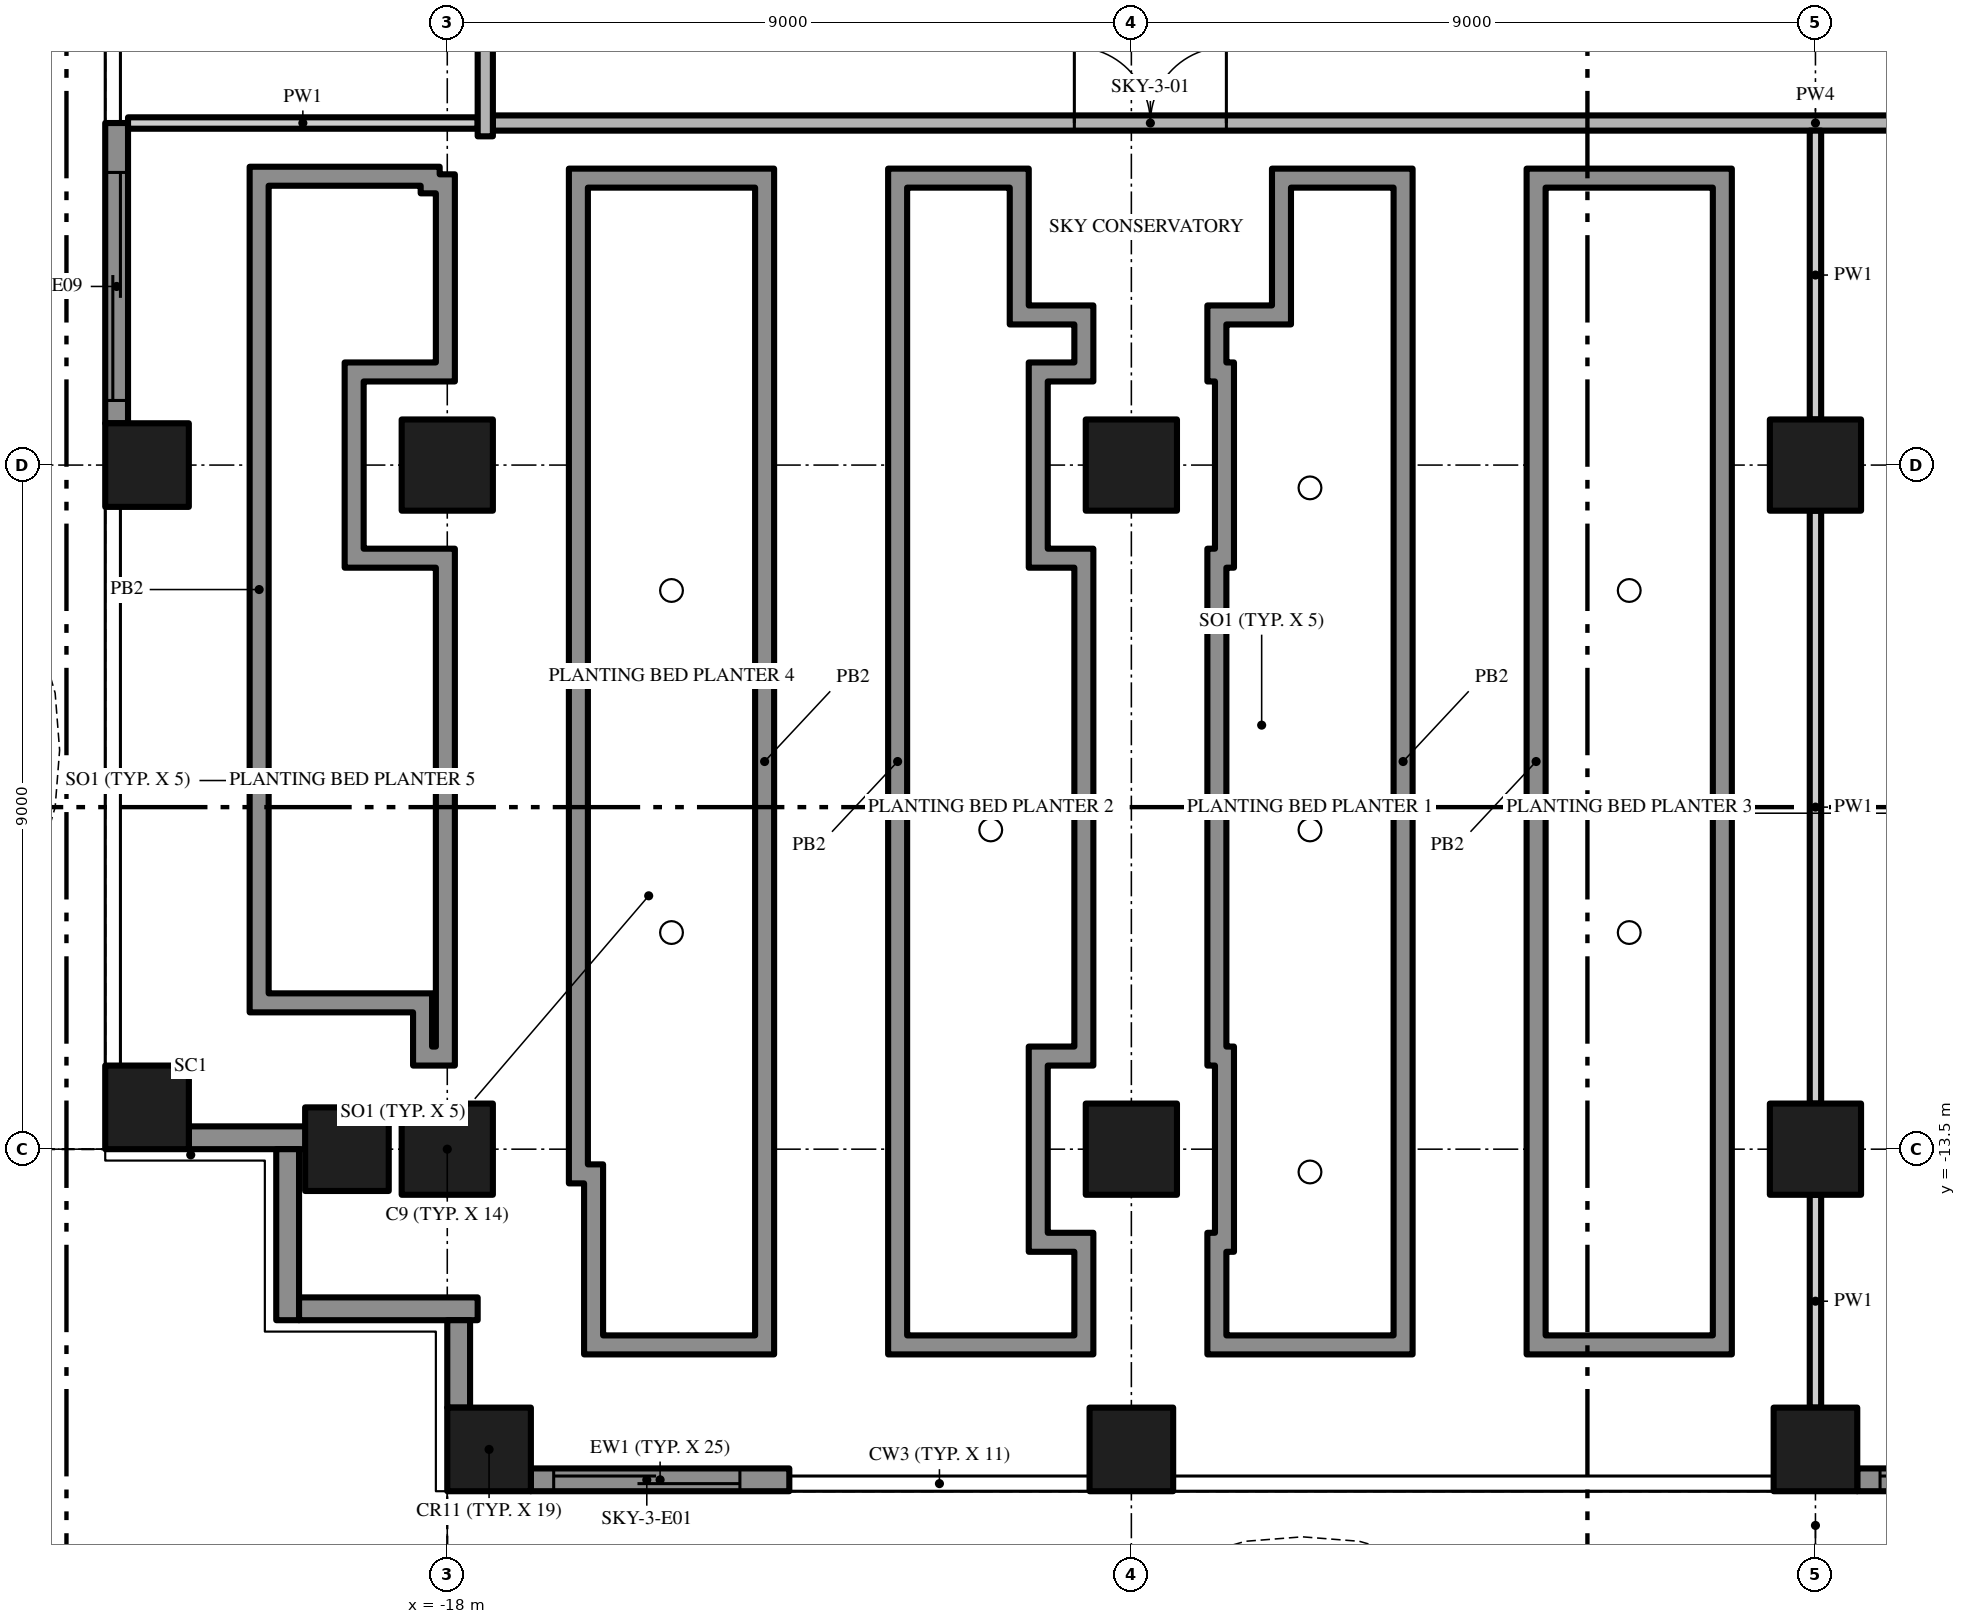
"""IFC4 building model, lengths in metres.
Left out: names, types, materials, properties, quantities, classifications, styles, units other than length and angle.
Written with IfcOpenShell. Run it as: python <this file> out.ifc"""

import sys

from ifc_helpers import new_model, si_unit, direction, frame, frame_2d, origin, origin_2d, place, context, subcontext, project, spatial, polyline, rectangle, outline, extrude, element, fill, save


model = new_model("IFC4")
c1 = context("Model", 3, precision=1e-05, world=origin(), true_north=direction((0.0, 1.0)))
c2 = subcontext(c1, "Body", "Model", "MODEL_VIEW")
j1 = project(units=[si_unit("LENGTHUNIT", "METRE"), si_unit("PLANEANGLEUNIT", "RADIAN")], contexts=[c1])
p1 = place(None, origin())
s1 = spatial("IfcSite", under=j1, at=p1, CompositionType="ELEMENT")
p2 = place(p1, origin())
s2 = spatial("IfcBuilding", under=s1, at=p2, CompositionType="ELEMENT")
p3 = place(p2, frame((0.0, 0.0, 174.4)))
s3 = spatial("IfcBuildingStorey", under=s2, at=p3, CompositionType="ELEMENT", Elevation=174.4)
p4 = place(p3, frame((-18.0, -13.5, 0.0), z_axis=(0.0, 0.0, 1.0), x_axis=(1.0, 0.0, 0.0)))
e1 = element("IfcColumn", 1, at=p4, inside=s3, PredefinedType="COLUMN", context=c2, shape_type="SweptSolid", body=[
    extrude(rectangle(XDim=1.2, YDim=1.2, at=origin_2d()), origin(), (0.0, 0.0, 1.0), 4.7),
])
p5 = place(p3, frame((-17.45, -17.45, 0.0), z_axis=(0.0, 0.0, 1.0), x_axis=(1.0, 0.0, 0.0)))
e2 = element("IfcColumn", 2, at=p5, inside=s3, PredefinedType="COLUMN", context=c2, shape_type="SweptSolid", body=[
    extrude(rectangle(XDim=1.1, YDim=1.1, at=origin_2d()), origin(), (0.0, 0.0, 1.0), 4.7),
])
p6 = place(p3, frame((-18.0, -4.5, 0.0), z_axis=(0.0, 0.0, 1.0), x_axis=(1.0, 0.0, 0.0)))
e3 = element("IfcColumn", 3, at=p6, inside=s3, PredefinedType="COLUMN", context=c2, shape_type="SweptSolid", body=[
    extrude(rectangle(XDim=1.2, YDim=1.2, at=origin_2d()), origin(), (0.0, 0.0, 1.0), 4.7),
])
for number, where, z_axis, x_axis in (
    (4, (-21.95, -12.95, 0.0), (0.0, 0.0, 1.0), (1.0, 0.0, 0.0)),
    (5, (-19.32, -13.5, 0.0), (0.0, 0.0, 1.0), (1.0, 0.0, 0.0)),
    (6, (-21.95, -4.5, 0.0), (0.0, 0.0, 1.0), (1.0, 0.0, 0.0)),
):
    element("IfcColumn", number, at=place(p3, frame(where, z_axis=z_axis, x_axis=x_axis)), inside=s3, PredefinedType="COLUMN", context=c2, shape_type="SweptSolid", body=[
        extrude(rectangle(XDim=1.1, YDim=1.1, at=origin_2d()), origin(), (0.0, 0.0, 1.0), 4.7),
    ])
p7 = place(p3, frame((-9.0, -13.5, 0.0), z_axis=(0.0, 0.0, 1.0), x_axis=(1.0, 0.0, 0.0)))
e7 = element("IfcColumn", 7, at=p7, inside=s3, PredefinedType="COLUMN", context=c2, shape_type="SweptSolid", body=[
    extrude(rectangle(XDim=1.2, YDim=1.2, at=origin_2d()), origin(), (0.0, 0.0, 1.0), 4.7),
])
p8 = place(p3, frame((-9.0, -17.45, 0.0), z_axis=(0.0, 0.0, 1.0), x_axis=(1.0, 0.0, 0.0)))
e8 = element("IfcColumn", 8, at=p8, inside=s3, PredefinedType="COLUMN", context=c2, shape_type="SweptSolid", body=[
    extrude(rectangle(XDim=1.1, YDim=1.1, at=origin_2d()), origin(), (0.0, 0.0, 1.0), 4.7),
])
for number, where, z_axis, x_axis in (
    (9, (-9.0, -4.5, 0.0), (0.0, 0.0, 1.0), (1.0, 0.0, 0.0)),
    (10, (0.0, -13.5, 0.0), (0.0, 0.0, 1.0), (1.0, 0.0, 0.0)),
):
    element("IfcColumn", number, at=place(p3, frame(where, z_axis=z_axis, x_axis=x_axis)), inside=s3, PredefinedType="COLUMN", context=c2, shape_type="SweptSolid", body=[
        extrude(rectangle(XDim=1.2, YDim=1.2, at=origin_2d()), origin(), (0.0, 0.0, 1.0), 4.7),
    ])
p9 = place(p3, frame((0.0, -17.45, 0.0), z_axis=(0.0, 0.0, 1.0), x_axis=(1.0, 0.0, 0.0)))
e11 = element("IfcColumn", 11, at=p9, inside=s3, PredefinedType="COLUMN", context=c2, shape_type="SweptSolid", body=[
    extrude(rectangle(XDim=1.1, YDim=1.1, at=origin_2d()), origin(), (0.0, 0.0, 1.0), 4.7),
])
p10 = place(p3, frame((0.0, -4.5, 0.0), z_axis=(0.0, 0.0, 1.0), x_axis=(1.0, 0.0, 0.0)))
e12 = element("IfcColumn", 12, at=p10, inside=s3, PredefinedType="COLUMN", context=c2, shape_type="SweptSolid", body=[
    extrude(rectangle(XDim=1.2, YDim=1.2, at=origin_2d()), origin(), (0.0, 0.0, 1.0), 4.7),
])
p11 = place(p3, frame((-13.5, -17.85, 0.0), z_axis=(0.0, 0.0, 1.0), x_axis=(-1.0, 0.0, 0.0)))
e13 = element("IfcWall", 13, at=p11, inside=s3, PredefinedType="SOLIDWALL", context=c2, shape_type="SweptSolid", body=[
    extrude(rectangle(XDim=3.4, YDim=0.3, at=frame_2d((1.7, 0.0))), origin(), (0.0, 0.0, 1.0), 4.7),
])
p12 = place(p11, frame((0.65, 0.0, 0.0)))
e14 = element("IfcOpeningElement", 14, at=p12, cuts=e13, PredefinedType="OPENING", context=c2, shape_type="SweptSolid", body=[
    extrude(rectangle(XDim=2.45, YDim=2.4, at=frame_2d((1.225, 1.2))), frame((0.0, 0.16, 0.0), z_axis=(0.0, -1.0, 0.0), x_axis=(1.0, 0.0, 0.0)), (0.0, 0.0, 1.0), 0.32),
])
p13 = place(p3, frame((4.5, -17.85, 0.0), z_axis=(0.0, 0.0, 1.0), x_axis=(-1.0, 0.0, 0.0)))
e15 = element("IfcWall", 15, at=p13, inside=s3, PredefinedType="SOLIDWALL", context=c2, shape_type="SweptSolid", body=[
    extrude(rectangle(XDim=3.95, YDim=0.3, at=frame_2d((1.975, 0.0))), origin(), (0.0, 0.0, 1.0), 4.7),
])
p14 = place(p13, frame((0.65, 0.0, 0.0)))
e16 = element("IfcOpeningElement", 16, at=p14, cuts=e15, PredefinedType="OPENING", context=c2, shape_type="SweptSolid", body=[
    extrude(rectangle(XDim=3.0, YDim=2.4, at=frame_2d((1.5, 1.2))), frame((0.0, 0.16, 0.0), z_axis=(0.0, -1.0, 0.0), x_axis=(1.0, 0.0, 0.0)), (0.0, 0.0, 1.0), 0.32),
])
p15 = place(p3, frame((-22.35, -3.95, 0.0), z_axis=(0.0, 0.0, 1.0), x_axis=(0.0, 1.0, 0.0)))
e17 = element("IfcWall", 17, at=p15, inside=s3, PredefinedType="SOLIDWALL", context=c2, shape_type="SweptSolid", body=[
    extrude(rectangle(XDim=3.95, YDim=0.3, at=frame_2d((1.975, 0.0))), origin(), (0.0, 0.0, 1.0), 4.7),
])
p16 = place(p15, frame((0.3, 0.0, 0.0)))
e18 = element("IfcOpeningElement", 18, at=p16, cuts=e17, PredefinedType="OPENING", context=c2, shape_type="SweptSolid", body=[
    extrude(rectangle(XDim=3.0, YDim=2.4, at=frame_2d((1.5, 1.2))), frame((0.0, 0.16, 0.0), z_axis=(0.0, -1.0, 0.0), x_axis=(1.0, 0.0, 0.0)), (0.0, 0.0, 1.0), 0.32),
])
p17 = place(p3, frame((-19.85, -13.35, 0.0), z_axis=(0.0, 0.0, 1.0), x_axis=(-1.0, 0.0, 0.0)))
e19 = element("IfcWall", 19, at=p17, inside=s3, PredefinedType="SOLIDWALL", context=c2, shape_type="SweptSolid", body=[
    extrude(rectangle(XDim=1.55, YDim=0.3, at=frame_2d((0.775, 0.0))), origin(), (0.0, 0.0, 1.0), 4.7),
])
p18 = place(p3, frame((-20.1, -15.75, 0.0), z_axis=(0.0, 0.0, 1.0), x_axis=(0.0, 1.0, 0.0)))
e20 = element("IfcWall", 20, at=p18, inside=s3, PredefinedType="SOLIDWALL", context=c2, shape_type="SweptSolid", body=[
    extrude(rectangle(XDim=2.25, YDim=0.3, at=frame_2d((1.125, 0.0))), origin(), (0.0, 0.0, 1.0), 4.7),
])
p19 = place(p3, frame((-17.6, -15.6, 0.0), z_axis=(0.0, 0.0, 1.0), x_axis=(-1.0, 0.0, 0.0)))
e21 = element("IfcWall", 21, at=p19, inside=s3, PredefinedType="SOLIDWALL", context=c2, shape_type="SweptSolid", body=[
    extrude(rectangle(XDim=2.35, YDim=0.3, at=frame_2d((1.175, 0.0))), origin(), (0.0, 0.0, 1.0), 4.7),
])
p20 = place(p3, frame((-17.85, -16.9, 0.0), z_axis=(0.0, 0.0, 1.0), x_axis=(0.0, 1.0, 0.0)))
e22 = element("IfcWall", 22, at=p20, inside=s3, PredefinedType="SOLIDWALL", context=c2, shape_type="SweptSolid", body=[
    extrude(rectangle(XDim=1.15, YDim=0.3, at=frame_2d((0.575, 0.0))), origin(), (0.0, 0.0, 1.0), 4.7),
])
p21 = place(p3, origin())
e23 = element("IfcWall", 23, at=p21, inside=s3, PredefinedType="USERDEFINED", context=c2, shape_type="SweptSolid", body=[
    extrude(outline(polyline([(-18.0, -19.8), (-16.5, -20.505), (-15.0, -20.941), (-14.25, -21.0), (-13.5, -20.941), (-12.0, -20.505), (-10.5, -19.8), (-9.0, -19.095), (-7.5, -18.659), (-6.75, -18.6), (-6.0, -18.659), (-4.5, -19.095), (-3.0, -19.8), (-1.5, -20.505), (0.0, -20.941), (0.75, -21.0), (1.5, -20.941), (3.0, -20.505), (4.5, -19.8), (6.0, -19.095), (7.5, -18.659), (8.25, -18.6), (9.0, -18.659), (10.5, -19.095), (12.0, -19.8), (13.5, -20.505), (15.0, -20.941), (15.75, -21.0), (16.5, -20.941), (18.0, -20.505), (17.93, -20.265), (16.455, -20.694), (15.75, -20.749), (15.045, -20.694), (13.589, -20.271), (12.106, -19.574), (10.589, -18.86), (9.045, -18.411), (8.25, -18.349), (7.455, -18.411), (5.911, -18.86), (4.394, -19.574), (2.911, -20.271), (1.455, -20.694), (0.75, -20.749), (0.045, -20.694), (-1.411, -20.271), (-2.894, -19.574), (-4.411, -18.86), (-5.955, -18.411), (-6.75, -18.349), (-7.545, -18.411), (-9.089, -18.86), (-10.606, -19.574), (-12.089, -20.271), (-13.545, -20.694), (-14.25, -20.749), (-14.955, -20.694), (-16.411, -20.271), (-17.894, -19.574), (-18.0, -19.8)])), origin(), (0.0, 0.0, 1.0), 0.9),
])
p22 = place(p3, origin())
e24 = element("IfcWall", 24, at=p22, inside=s3, PredefinedType="USERDEFINED", context=c2, shape_type="SweptSolid", body=[
    extrude(outline(polyline([(-24.3, 18.0), (-25.005, 16.5), (-25.441, 15.0), (-25.5, 14.25), (-25.441, 13.5), (-25.005, 12.0), (-24.3, 10.5), (-23.595, 9.0), (-23.159, 7.5), (-23.1, 6.75), (-23.159, 6.0), (-23.595, 4.5), (-24.3, 3.0), (-25.005, 1.5), (-25.441, 0.0), (-25.5, -0.75), (-25.441, -1.5), (-25.005, -3.0), (-24.3, -4.5), (-23.595, -6.0), (-23.159, -7.5), (-23.1, -8.25), (-23.159, -9.0), (-23.595, -10.5), (-24.3, -12.0), (-25.005, -13.5), (-24.779, -13.606), (-24.074, -12.106), (-23.36, -10.589), (-22.911, -9.045), (-22.849, -8.25), (-22.911, -7.455), (-23.36, -5.911), (-24.074, -4.394), (-24.771, -2.911), (-25.194, -1.455), (-25.249, -0.75), (-25.194, -0.045), (-24.771, 1.411), (-24.074, 2.894), (-23.36, 4.411), (-22.911, 5.955), (-22.849, 6.75), (-22.911, 7.545), (-23.36, 9.089), (-24.074, 10.606), (-24.771, 12.089), (-25.194, 13.545), (-25.249, 14.25), (-25.194, 14.955), (-24.771, 16.411), (-24.074, 17.894), (-24.3, 18.0)])), origin(), (0.0, 0.0, 1.0), 0.9),
])
p23 = place(p3, frame((-17.4, 0.0, 0.0), z_axis=(0.0, 0.0, 1.0), x_axis=(1.0, 0.0, 0.0)))
e25 = element("IfcWall", 25, at=p23, inside=s3, PredefinedType="PARTITIONING", context=c2, shape_type="SweptSolid", body=[
    extrude(rectangle(XDim=34.8, YDim=0.2, at=frame_2d((17.4, 0.0))), origin(), (0.0, 0.0, 1.0), 4.7),
])
p24 = place(p23, frame((7.65, 0.0, 0.0)))
e26 = element("IfcOpeningElement", 26, at=p24, cuts=e25, PredefinedType="OPENING", context=c2, shape_type="SweptSolid", body=[
    extrude(rectangle(XDim=2.0, YDim=2.4, at=frame_2d((1.0, 1.2))), frame((0.0, 0.11, 0.0), z_axis=(0.0, -1.0, 0.0), x_axis=(1.0, 0.0, 0.0)), (0.0, 0.0, 1.0), 0.22),
])
p25 = place(p23, frame((20.9, 0.0, 0.0)))
e27 = element("IfcOpeningElement", 27, at=p25, cuts=e25, PredefinedType="OPENING", context=c2, shape_type="SweptSolid", body=[
    extrude(rectangle(XDim=2.0, YDim=2.4, at=frame_2d((1.0, 1.2))), frame((0.0, 0.11, 0.0), z_axis=(0.0, -1.0, 0.0), x_axis=(1.0, 0.0, 0.0)), (0.0, 0.0, 1.0), 0.22),
])
p26 = place(p23, frame((29.65, 0.0, 0.0)))
e28 = element("IfcOpeningElement", 28, at=p26, cuts=e25, PredefinedType="OPENING", context=c2, shape_type="SweptSolid", body=[
    extrude(rectangle(XDim=2.0, YDim=2.4, at=frame_2d((1.0, 1.2))), frame((0.0, 0.11, 0.0), z_axis=(0.0, -1.0, 0.0), x_axis=(1.0, 0.0, 0.0)), (0.0, 0.0, 1.0), 0.22),
])
p27 = place(p3, frame((-22.2, 0.0, 0.0), z_axis=(0.0, 0.0, 1.0), x_axis=(1.0, 0.0, 0.0)))
e29 = element("IfcWall", 29, at=p27, inside=s3, PredefinedType="PARTITIONING", context=c2, shape_type="SweptSolid", body=[
    extrude(rectangle(XDim=4.6, YDim=0.15, at=frame_2d((2.3, 0.0))), origin(), (0.0, 0.0, 1.0), 4.7),
])
p28 = place(p3, frame((-17.5, -0.175, 0.0), z_axis=(0.0, 0.0, 1.0), x_axis=(0.0, 1.0, 0.0)))
e30 = element("IfcWall", 30, at=p28, inside=s3, PredefinedType="PARTITIONING", context=c2, shape_type="SweptSolid", body=[
    extrude(rectangle(XDim=4.075, YDim=0.2, at=frame_2d((2.038, 0.0))), origin(), (0.0, 0.0, 1.0), 4.7),
])
p29 = place(p3, frame((0.0, -16.9, 0.0), z_axis=(0.0, 0.0, 1.0), x_axis=(0.0, 1.0, 0.0)))
e31 = element("IfcWall", 31, at=p29, inside=s3, PredefinedType="PARTITIONING", context=c2, shape_type="SweptSolid", body=[
    extrude(rectangle(XDim=2.8, YDim=0.15, at=frame_2d((1.4, 0.0))), origin(), (0.0, 0.0, 1.0), 4.7),
])
p30 = place(p3, frame((0.0, -12.9, 0.0), z_axis=(0.0, 0.0, 1.0), x_axis=(0.0, 1.0, 0.0)))
e32 = element("IfcWall", 32, at=p30, inside=s3, PredefinedType="PARTITIONING", context=c2, shape_type="SweptSolid", body=[
    extrude(rectangle(XDim=7.8, YDim=0.15, at=frame_2d((3.9, 0.0))), origin(), (0.0, 0.0, 1.0), 4.7),
])
p31 = place(p3, frame((0.0, -3.9, 0.0), z_axis=(0.0, 0.0, 1.0), x_axis=(0.0, 1.0, 0.0)))
e33 = element("IfcWall", 33, at=p31, inside=s3, PredefinedType="PARTITIONING", context=c2, shape_type="SweptSolid", body=[
    extrude(rectangle(XDim=3.8, YDim=0.15, at=frame_2d((1.9, 0.0))), origin(), (0.0, 0.0, 1.0), 4.7),
])
p32 = place(p3, origin())
e34 = element("IfcWall", 34, at=p32, inside=s3, PredefinedType="USERDEFINED", context=c2, shape_type="SweptSolid", body=[
    extrude(outline(polyline([(-5.3, -16.2), (-5.3, -0.6), (-7.15, -0.6), (-7.15, -2.4), (-8.0, -2.4), (-8.0, -3.4), (-7.9, -3.4), (-7.9, -5.6), (-8.0, -5.6), (-8.0, -12.4), (-7.9, -12.4), (-7.9, -14.6), (-8.0, -14.6), (-8.0, -16.2), (-5.3, -16.2)]), holes=[polyline([(-7.75, -15.95), (-7.75, -14.85), (-7.65, -14.85), (-7.65, -12.15), (-7.75, -12.15), (-7.75, -5.85), (-7.65, -5.85), (-7.65, -3.15), (-7.75, -3.15), (-7.75, -2.65), (-6.9, -2.65), (-6.9, -0.85), (-5.55, -0.85), (-5.55, -15.95), (-7.75, -15.95)])]), origin(), (0.0, 0.0, 1.0), 0.9),
])
p33 = place(p3, origin())
e35 = element("IfcWall", 35, at=p33, inside=s3, PredefinedType="USERDEFINED", context=c2, shape_type="SweptSolid", body=[
    extrude(outline(polyline([(-9.5, -16.2), (-9.5, -14.6), (-10.1, -14.6), (-10.1, -12.4), (-9.5, -12.4), (-9.5, -5.6), (-10.1, -5.6), (-10.1, -3.4), (-9.5, -3.4), (-9.5, -2.4), (-10.35, -2.4), (-10.35, -0.6), (-12.2, -0.6), (-12.2, -16.2), (-9.5, -16.2)]), holes=[polyline([(-11.95, -15.95), (-11.95, -0.85), (-10.6, -0.85), (-10.6, -2.65), (-9.75, -2.65), (-9.75, -3.15), (-10.35, -3.15), (-10.35, -5.85), (-9.75, -5.85), (-9.75, -12.15), (-10.35, -12.15), (-10.35, -14.85), (-9.75, -14.85), (-9.75, -15.95), (-11.95, -15.95)])]), origin(), (0.0, 0.0, 1.0), 0.9),
])
p34 = place(p3, origin())
e36 = element("IfcWall", 36, at=p34, inside=s3, PredefinedType="USERDEFINED", context=c2, shape_type="SweptSolid", body=[
    extrude(outline(polyline([(-1.1, -16.2), (-1.1, -14.6), (-1.1, -12.4), (-1.1, -5.6), (-1.1, -3.4), (-1.1, -0.6), (-3.8, -0.6), (-3.8, -16.2), (-1.1, -16.2)]), holes=[polyline([(-3.55, -15.95), (-3.55, -0.85), (-1.35, -0.85), (-1.35, -3.4), (-1.35, -5.6), (-1.35, -12.4), (-1.35, -14.6), (-1.35, -15.95), (-3.55, -15.95)])]), origin(), (0.0, 0.0, 1.0), 0.9),
])
p35 = place(p3, origin())
e37 = element("IfcWall", 37, at=p35, inside=s3, PredefinedType="USERDEFINED", context=c2, shape_type="SweptSolid", body=[
    extrude(outline(polyline([(-13.7, -16.2), (-13.7, -0.6), (-16.4, -0.6), (-16.4, -13.95), (-16.2, -13.95), (-16.2, -16.2), (-13.7, -16.2)]), holes=[polyline([(-15.95, -15.95), (-15.95, -13.7), (-16.15, -13.7), (-16.15, -0.85), (-13.95, -0.85), (-13.95, -15.95), (-15.95, -15.95)])]), origin(), (0.0, 0.0, 1.0), 0.9),
])
p36 = place(p3, origin())
e38 = element("IfcWall", 38, at=p36, inside=s3, PredefinedType="USERDEFINED", context=c2, shape_type="SweptSolid", body=[
    extrude(outline(polyline([(-17.9, -12.4), (-17.9, -5.6), (-19.1, -5.6), (-19.1, -3.4), (-17.9, -3.4), (-17.9, -0.675), (-18.1, -0.675), (-18.1, -0.575), (-20.6, -0.575), (-20.6, -11.7), (-18.45, -11.7), (-18.45, -12.4), (-17.9, -12.4)]), holes=[polyline([(-18.2, -12.15), (-18.2, -11.45), (-20.35, -11.45), (-20.35, -0.825), (-18.35, -0.825), (-18.35, -0.925), (-18.15, -0.925), (-18.15, -3.15), (-19.35, -3.15), (-19.35, -5.85), (-18.15, -5.85), (-18.15, -12.15), (-18.2, -12.15)])]), origin(), (0.0, 0.0, 1.0), 0.9),
])
p37 = place(p12, origin())
e39 = element("IfcDoor", 39, at=p37, inside=s3, OperationType="SINGLE_SWING_LEFT", PredefinedType="DOOR", context=c2, shape_type="SweptSolid", body=[
    extrude(rectangle(XDim=2.45, YDim=2.4, at=frame_2d((1.225, 1.2))), frame((0.0, 0.025, 0.0), z_axis=(0.0, -1.0, 0.0), x_axis=(1.0, 0.0, 0.0)), (0.0, 0.0, 1.0), 0.05),
])
fill(e14, e39)
p38 = place(p14, origin())
e40 = element("IfcDoor", 40, at=p38, inside=s3, OperationType="SINGLE_SWING_LEFT", PredefinedType="DOOR", context=c2, shape_type="SweptSolid", body=[
    extrude(rectangle(XDim=3.0, YDim=2.4, at=frame_2d((1.5, 1.2))), frame((0.0, 0.025, 0.0), z_axis=(0.0, -1.0, 0.0), x_axis=(1.0, 0.0, 0.0)), (0.0, 0.0, 1.0), 0.05),
])
fill(e16, e40)
p39 = place(p16, origin())
e41 = element("IfcDoor", 41, at=p39, inside=s3, OperationType="SINGLE_SWING_LEFT", PredefinedType="DOOR", context=c2, shape_type="SweptSolid", body=[
    extrude(rectangle(XDim=3.0, YDim=2.4, at=frame_2d((1.5, 1.2))), frame((0.0, 0.025, 0.0), z_axis=(0.0, -1.0, 0.0), x_axis=(1.0, 0.0, 0.0)), (0.0, 0.0, 1.0), 0.05),
])
fill(e18, e41)
p40 = place(p24, origin())
e42 = element("IfcDoor", 42, at=p40, inside=s3, OperationType="DOUBLE_DOOR_SINGLE_SWING", PredefinedType="DOOR", context=c2, shape_type="SweptSolid", body=[
    extrude(rectangle(XDim=2.0, YDim=2.4, at=frame_2d((1.0, 1.2))), frame((0.0, 0.025, 0.0), z_axis=(0.0, -1.0, 0.0), x_axis=(1.0, 0.0, 0.0)), (0.0, 0.0, 1.0), 0.05),
])
fill(e26, e42)
save(model, sys.argv[1])
